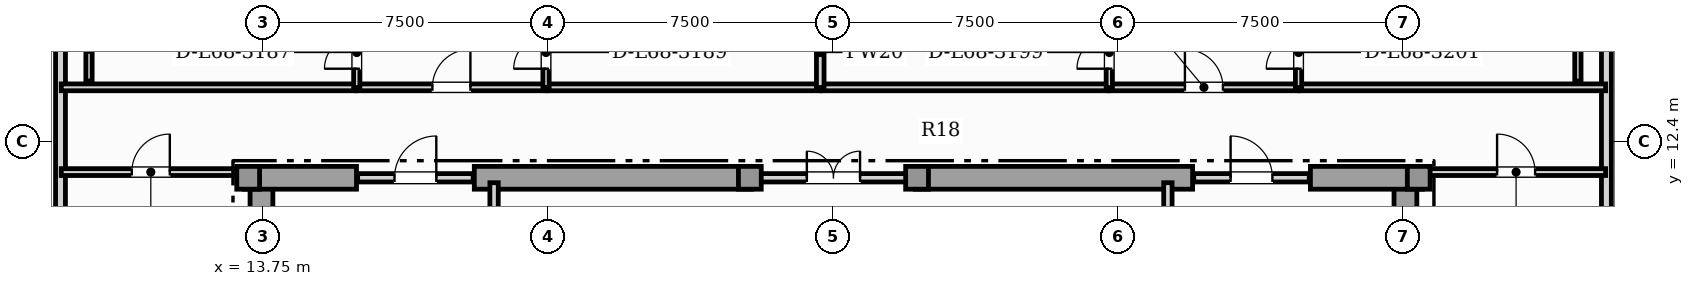
"""IFC4 building model, lengths in metres.
Left out: names, types, materials, properties, quantities, classifications, styles, units other than length and angle.
Written with IfcOpenShell. Run it as: python <this file> out.ifc"""

import sys

from ifc_helpers import new_model, si_unit, direction, frame, frame_2d, origin, origin_2d, place, context, subcontext, project, spatial, rectangle, extrude, element, fill, save


model = new_model("IFC4")
c1 = context("Model", 3, precision=1e-05, world=origin(), true_north=direction((0.0, 1.0)))
c2 = subcontext(c1, "Body", "Model", "MODEL_VIEW")
j1 = project(units=[si_unit("LENGTHUNIT", "METRE"), si_unit("PLANEANGLEUNIT", "RADIAN")], contexts=[c1])
p1 = place(None, origin())
s1 = spatial("IfcSite", under=j1, at=p1, CompositionType="ELEMENT")
p2 = place(p1, origin())
s2 = spatial("IfcBuilding", under=s1, at=p2, CompositionType="ELEMENT")
p3 = place(p2, frame((0.0, 0.0, 276.0)))
s3 = spatial("IfcBuildingStorey", under=s2, at=p3, CompositionType="ELEMENT", Elevation=276.0)
for number, where, z_axis, x_axis in (
    (1, (13.7, 0.92, 0.0), (0.0, 0.0, 1.0), (0.0, 1.0, 0.0)),
    (2, (43.8, 0.92, 0.0), (0.0, 0.0, 1.0), (0.0, 1.0, 0.0)),
):
    element("IfcWall", number, at=place(p3, frame(where, z_axis=z_axis, x_axis=x_axis)), inside=s3, PredefinedType="SHEAR", context=c2, shape_type="SweptSolid", body=[
        extrude(rectangle(XDim=10.53, YDim=0.6, at=frame_2d((5.265, 0.0))), origin(), (0.0, 0.0, 1.0), 4.85),
    ])
p4 = place(p3, frame((13.25, 11.45, 0.0), z_axis=(0.0, 0.0, 1.0), x_axis=(1.0, 0.0, 0.0)))
e3 = element("IfcWall", 3, at=p4, inside=s3, PredefinedType="SHEAR", context=c2, shape_type="SweptSolid", body=[
    extrude(rectangle(XDim=2.95, YDim=0.6, at=frame_2d((1.475, 0.0))), origin(), (0.0, 0.0, 1.0), 4.85),
])
for number, where, z_axis, x_axis in (
    (4, (19.3, 11.45, 0.0), (0.0, 0.0, 1.0), (1.0, 0.0, 0.0)),
    (5, (30.9, 11.45, 0.0), (0.0, 0.0, 1.0), (1.0, 0.0, 0.0)),
):
    element("IfcWall", number, at=place(p3, frame(where, z_axis=z_axis, x_axis=x_axis)), inside=s3, PredefinedType="SHEAR", context=c2, shape_type="SweptSolid", body=[
        extrude(rectangle(XDim=7.3, YDim=0.6, at=frame_2d((3.65, 0.0))), origin(), (0.0, 0.0, 1.0), 4.85),
    ])
p5 = place(p3, frame((41.3, 11.45, 0.0), z_axis=(0.0, 0.0, 1.0), x_axis=(1.0, 0.0, 0.0)))
e6 = element("IfcWall", 6, at=p5, inside=s3, PredefinedType="SHEAR", context=c2, shape_type="SweptSolid", body=[
    extrude(rectangle(XDim=2.95, YDim=0.6, at=frame_2d((1.475, 0.0))), origin(), (0.0, 0.0, 1.0), 4.85),
])
for number, where, z_axis, x_axis in (
    (7, (13.35, 11.45, 0.0), (0.0, 0.0, 1.0), (1.0, 0.0, 0.0)),
    (8, (44.15, 11.45, 0.0), (0.0, 0.0, 1.0), (1.0, 0.0, 0.0)),
    (9, (26.55, 11.45, 0.0), (0.0, 0.0, 1.0), (1.0, 0.0, 0.0)),
    (10, (30.95, 11.45, 0.0), (0.0, 0.0, 1.0), (1.0, 0.0, 0.0)),
):
    element("IfcColumn", number, at=place(p3, frame(where, z_axis=z_axis, x_axis=x_axis)), inside=s3, PredefinedType="COLUMN", context=c2, shape_type="SweptSolid", body=[
        extrude(rectangle(XDim=0.6, YDim=0.6, at=origin_2d()), origin(), (0.0, 0.0, 1.0), 5.05),
    ])
p6 = place(p3, frame((49.088, 3.24, 0.0), z_axis=(0.0, 0.0, 1.0), x_axis=(0.0, 1.0, 0.0)))
e11 = element("IfcWall", 11, at=p6, inside=s3, PredefinedType="SOLIDWALL", context=c2, shape_type="SweptSolid", body=[
    extrude(rectangle(XDim=15.289, YDim=0.26, at=frame_2d((7.645, 0.0))), origin(), (0.0, 0.0, 1.0), 4.85),
])
p7 = place(p6, frame((12.739, 0.0, 0.95)))
e12 = element("IfcOpeningElement", 12, at=p7, cuts=e11, PredefinedType="OPENING", context=c2, shape_type="SweptSolid", body=[
    extrude(rectangle(XDim=0.9, YDim=1.5, at=frame_2d((0.45, 0.75))), frame((0.0, 0.14, 0.0), z_axis=(0.0, -1.0, 0.0), x_axis=(1.0, 0.0, 0.0)), (0.0, 0.0, 1.0), 0.28),
])
p8 = place(p3, frame((8.412, 18.529, 0.0), z_axis=(0.0, 0.0, 1.0), x_axis=(0.0, -1.0, 0.0)))
e13 = element("IfcWall", 13, at=p8, inside=s3, PredefinedType="SOLIDWALL", context=c2, shape_type="SweptSolid", body=[
    extrude(rectangle(XDim=15.289, YDim=0.26, at=frame_2d((7.645, 0.0))), origin(), (0.0, 0.0, 1.0), 4.85),
])
p9 = place(p8, frame((9.239, 0.0, 0.85)))
e14 = element("IfcOpeningElement", 14, at=p9, cuts=e13, PredefinedType="OPENING", context=c2, shape_type="SweptSolid", body=[
    extrude(rectangle(XDim=2.4, YDim=2.0, at=frame_2d((1.2, 1.0))), frame((0.0, 0.14, 0.0), z_axis=(0.0, -1.0, 0.0), x_axis=(1.0, 0.0, 0.0)), (0.0, 0.0, 1.0), 0.28),
])
p10 = place(p3, frame((19.82, 8.52, 0.0), z_axis=(0.0, 0.0, 1.0), x_axis=(0.0, 1.0, 0.0)))
e15 = element("IfcWall", 15, at=p10, inside=s3, PredefinedType="SOLIDWALL", context=c2, shape_type="SweptSolid", body=[
    extrude(rectangle(XDim=2.8, YDim=0.22, at=frame_2d((1.4, 0.0))), origin(), (0.0, 0.0, 1.0), 4.305),
])
p11 = place(p10, frame((0.85, 0.0, 0.0)))
e16 = element("IfcOpeningElement", 16, at=p11, cuts=e15, PredefinedType="OPENING", context=c2, shape_type="SweptSolid", body=[
    extrude(rectangle(XDim=1.1, YDim=2.2, at=frame_2d((0.55, 1.1))), frame((0.0, 0.12, 0.0), z_axis=(0.0, -1.0, 0.0), x_axis=(1.0, 0.0, 0.0)), (0.0, 0.0, 1.0), 0.24),
])
p12 = place(p3, frame((37.55, 8.52, 0.0), z_axis=(0.0, 0.0, 1.0), x_axis=(0.0, 1.0, 0.0)))
e17 = element("IfcWall", 17, at=p12, inside=s3, PredefinedType="SOLIDWALL", context=c2, shape_type="SweptSolid", body=[
    extrude(rectangle(XDim=2.8, YDim=0.22, at=frame_2d((1.4, 0.0))), origin(), (0.0, 0.0, 1.0), 4.305),
])
p13 = place(p12, frame((0.85, 0.0, 0.0)))
e18 = element("IfcOpeningElement", 18, at=p13, cuts=e17, PredefinedType="OPENING", context=c2, shape_type="SweptSolid", body=[
    extrude(rectangle(XDim=1.1, YDim=2.2, at=frame_2d((0.55, 1.1))), frame((0.0, 0.12, 0.0), z_axis=(0.0, -1.0, 0.0), x_axis=(1.0, 0.0, 0.0)), (0.0, 0.0, 1.0), 0.24),
])
p14 = place(p3, frame((16.23, 11.45, 0.0), z_axis=(0.0, 0.0, 1.0), x_axis=(1.0, 0.0, 0.0)))
e19 = element("IfcWall", 19, at=p14, inside=s3, PredefinedType="SOLIDWALL", context=c2, shape_type="SweptSolid", body=[
    extrude(rectangle(XDim=3.04, YDim=0.22, at=frame_2d((1.52, 0.0))), origin(), (0.0, 0.0, 1.0), 4.85),
])
p15 = place(p14, frame((0.97, 0.0, 0.0)))
e20 = element("IfcOpeningElement", 20, at=p15, cuts=e19, PredefinedType="OPENING", context=c2, shape_type="SweptSolid", body=[
    extrude(rectangle(XDim=1.1, YDim=2.2, at=frame_2d((0.55, 1.1))), frame((0.0, 0.12, 0.0), z_axis=(0.0, -1.0, 0.0), x_axis=(1.0, 0.0, 0.0)), (0.0, 0.0, 1.0), 0.24),
])
p16 = place(p3, frame((26.63, 11.45, 0.0), z_axis=(0.0, 0.0, 1.0), x_axis=(1.0, 0.0, 0.0)))
e21 = element("IfcWall", 21, at=p16, inside=s3, PredefinedType="SOLIDWALL", context=c2, shape_type="SweptSolid", body=[
    extrude(rectangle(XDim=4.24, YDim=0.22, at=frame_2d((2.12, 0.0))), origin(), (0.0, 0.0, 1.0), 4.85),
])
p17 = place(p16, frame((1.42, 0.0, 0.0)))
e22 = element("IfcOpeningElement", 22, at=p17, cuts=e21, PredefinedType="OPENING", context=c2, shape_type="SweptSolid", body=[
    extrude(rectangle(XDim=1.4, YDim=2.2, at=frame_2d((0.7, 1.1))), frame((0.0, 0.12, 0.0), z_axis=(0.0, -1.0, 0.0), x_axis=(1.0, 0.0, 0.0)), (0.0, 0.0, 1.0), 0.24),
])
p18 = place(p3, frame((38.23, 11.45, 0.0), z_axis=(0.0, 0.0, 1.0), x_axis=(1.0, 0.0, 0.0)))
e23 = element("IfcWall", 23, at=p18, inside=s3, PredefinedType="SOLIDWALL", context=c2, shape_type="SweptSolid", body=[
    extrude(rectangle(XDim=3.04, YDim=0.22, at=frame_2d((1.52, 0.0))), origin(), (0.0, 0.0, 1.0), 4.85),
])
p19 = place(p18, frame((0.97, 0.0, 0.0)))
e24 = element("IfcOpeningElement", 24, at=p19, cuts=e23, PredefinedType="OPENING", context=c2, shape_type="SweptSolid", body=[
    extrude(rectangle(XDim=1.1, YDim=2.2, at=frame_2d((0.55, 1.1))), frame((0.0, 0.12, 0.0), z_axis=(0.0, -1.0, 0.0), x_axis=(1.0, 0.0, 0.0)), (0.0, 0.0, 1.0), 0.24),
])
p20 = place(p3, frame((8.431, 11.6, 0.0), z_axis=(0.0, 0.0, 1.0), x_axis=(1.0, 0.0, 0.0)))
e25 = element("IfcWall", 25, at=p20, inside=s3, PredefinedType="PARTITIONING", context=c2, shape_type="SweptSolid", body=[
    extrude(rectangle(XDim=4.714, YDim=0.18, at=frame_2d((2.357, 0.0))), origin(), (0.0, 0.0, 1.0), 4.85),
])
p21 = place(p20, frame((1.857, 0.0, 0.0)))
e26 = element("IfcOpeningElement", 26, at=p21, cuts=e25, PredefinedType="OPENING", context=c2, shape_type="SweptSolid", body=[
    extrude(rectangle(XDim=1.0, YDim=2.15, at=frame_2d((0.5, 1.075))), frame((0.0, 0.1, 0.0), z_axis=(0.0, -1.0, 0.0), x_axis=(1.0, 0.0, 0.0)), (0.0, 0.0, 1.0), 0.2),
])
p22 = place(p3, frame((44.355, 11.6, 0.0), z_axis=(0.0, 0.0, 1.0), x_axis=(1.0, 0.0, 0.0)))
e27 = element("IfcWall", 27, at=p22, inside=s3, PredefinedType="PARTITIONING", context=c2, shape_type="SweptSolid", body=[
    extrude(rectangle(XDim=4.714, YDim=0.18, at=frame_2d((2.357, 0.0))), origin(), (0.0, 0.0, 1.0), 4.85),
])
p23 = place(p22, frame((1.857, 0.0, 0.0)))
e28 = element("IfcOpeningElement", 28, at=p23, cuts=e27, PredefinedType="OPENING", context=c2, shape_type="SweptSolid", body=[
    extrude(rectangle(XDim=1.0, YDim=2.15, at=frame_2d((0.5, 1.075))), frame((0.0, 0.1, 0.0), z_axis=(0.0, -1.0, 0.0), x_axis=(1.0, 0.0, 0.0)), (0.0, 0.0, 1.0), 0.2),
])
p24 = place(p3, frame((16.202, 13.83, 0.0), z_axis=(0.0, 0.0, 1.0), x_axis=(1.0, 0.0, 0.0)))
e29 = element("IfcWall", 29, at=p24, inside=s3, PredefinedType="PARTITIONING", context=c2, shape_type="SweptSolid", body=[
    extrude(rectangle(XDim=4.99, YDim=0.18, at=frame_2d((2.495, 0.0))), origin(), (0.0, 0.0, 1.0), 4.85),
])
p25 = place(p24, frame((1.995, 0.0, 0.0)))
e30 = element("IfcOpeningElement", 30, at=p25, cuts=e29, PredefinedType="OPENING", context=c2, shape_type="SweptSolid", body=[
    extrude(rectangle(XDim=1.0, YDim=2.15, at=frame_2d((0.5, 1.075))), frame((0.0, 0.1, 0.0), z_axis=(0.0, -1.0, 0.0), x_axis=(1.0, 0.0, 0.0)), (0.0, 0.0, 1.0), 0.2),
])
p26 = place(p3, frame((8.431, 13.83, 0.0), z_axis=(0.0, 0.0, 1.0), x_axis=(1.0, 0.0, 0.0)))
e31 = element("IfcWall", 31, at=p26, inside=s3, PredefinedType="PARTITIONING", context=c2, shape_type="SweptSolid", body=[
    extrude(rectangle(XDim=7.741, YDim=0.18, at=frame_2d((3.871, 0.0))), origin(), (0.0, 0.0, 1.0), 4.85),
])
p27 = place(p3, frame((21.222, 13.83, 0.0), z_axis=(0.0, 0.0, 1.0), x_axis=(1.0, 0.0, 0.0)))
e32 = element("IfcWall", 32, at=p27, inside=s3, PredefinedType="PARTITIONING", context=c2, shape_type="SweptSolid", body=[
    extrude(rectangle(XDim=7.185, YDim=0.18, at=frame_2d((3.593, 0.0))), origin(), (0.0, 0.0, 1.0), 4.85),
])
p28 = place(p3, frame((36.003, 13.83, 0.0), z_axis=(0.0, 0.0, 1.0), x_axis=(1.0, 0.0, 0.0)))
e33 = element("IfcWall", 33, at=p28, inside=s3, PredefinedType="PARTITIONING", context=c2, shape_type="SweptSolid", body=[
    extrude(rectangle(XDim=4.99, YDim=0.18, at=frame_2d((2.495, 0.0))), origin(), (0.0, 0.0, 1.0), 4.85),
])
p29 = place(p28, frame((1.995, 0.0, 0.0)))
e34 = element("IfcOpeningElement", 34, at=p29, cuts=e33, PredefinedType="OPENING", context=c2, shape_type="SweptSolid", body=[
    extrude(rectangle(XDim=1.0, YDim=2.15, at=frame_2d((0.5, 1.075))), frame((0.0, 0.1, 0.0), z_axis=(0.0, -1.0, 0.0), x_axis=(1.0, 0.0, 0.0)), (0.0, 0.0, 1.0), 0.2),
])
p30 = place(p3, frame((28.438, 13.83, 0.0), z_axis=(0.0, 0.0, 1.0), x_axis=(1.0, 0.0, 0.0)))
e35 = element("IfcWall", 35, at=p30, inside=s3, PredefinedType="PARTITIONING", context=c2, shape_type="SweptSolid", body=[
    extrude(rectangle(XDim=7.535, YDim=0.18, at=frame_2d((3.768, 0.0))), origin(), (0.0, 0.0, 1.0), 4.85),
])
p31 = place(p3, frame((41.023, 13.83, 0.0), z_axis=(0.0, 0.0, 1.0), x_axis=(1.0, 0.0, 0.0)))
e36 = element("IfcWall", 36, at=p31, inside=s3, PredefinedType="PARTITIONING", context=c2, shape_type="SweptSolid", body=[
    extrude(rectangle(XDim=8.046, YDim=0.18, at=frame_2d((4.023, 0.0))), origin(), (0.0, 0.0, 1.0), 4.85),
])
p32 = place(p3, frame((16.208, 13.825, 0.0), z_axis=(0.0, 0.0, 1.0), x_axis=(0.0, 1.0, 0.0)))
e37 = element("IfcWall", 37, at=p32, inside=s3, PredefinedType="PLUMBINGWALL", context=c2, shape_type="SweptSolid", body=[
    extrude(rectangle(XDim=1.84, YDim=0.165, at=frame_2d((0.92, 0.0))), origin(), (0.0, 0.0, 1.0), 4.85),
])
p33 = place(p32, frame((0.495, 0.0, 0.0)))
e38 = element("IfcOpeningElement", 38, at=p33, cuts=e37, PredefinedType="OPENING", context=c2, shape_type="SweptSolid", body=[
    extrude(rectangle(XDim=0.85, YDim=2.1, at=frame_2d((0.425, 1.05))), frame((0.0, 0.093, 0.0), z_axis=(0.0, -1.0, 0.0), x_axis=(1.0, 0.0, 0.0)), (0.0, 0.0, 1.0), 0.185),
])
p34 = place(p3, frame((21.188, 13.825, 0.0), z_axis=(0.0, 0.0, 1.0), x_axis=(0.0, 1.0, 0.0)))
e39 = element("IfcWall", 39, at=p34, inside=s3, PredefinedType="PLUMBINGWALL", context=c2, shape_type="SweptSolid", body=[
    extrude(rectangle(XDim=1.84, YDim=0.165, at=frame_2d((0.92, 0.0))), origin(), (0.0, 0.0, 1.0), 4.495),
])
p35 = place(p34, frame((0.495, 0.0, 0.0)))
e40 = element("IfcOpeningElement", 40, at=p35, cuts=e39, PredefinedType="OPENING", context=c2, shape_type="SweptSolid", body=[
    extrude(rectangle(XDim=0.85, YDim=2.1, at=frame_2d((0.425, 1.05))), frame((0.0, 0.093, 0.0), z_axis=(0.0, -1.0, 0.0), x_axis=(1.0, 0.0, 0.0)), (0.0, 0.0, 1.0), 0.185),
])
p36 = place(p3, frame((28.403, 13.825, 0.0), z_axis=(0.0, 0.0, 1.0), x_axis=(0.0, 1.0, 0.0)))
e41 = element("IfcWall", 41, at=p36, inside=s3, PredefinedType="PARTITIONING", context=c2, shape_type="SweptSolid", body=[
    extrude(rectangle(XDim=1.84, YDim=0.2, at=frame_2d((0.92, 0.0))), origin(), (0.0, 0.0, 1.0), 4.85),
])
p37 = place(p3, frame((36.008, 13.825, 0.0), z_axis=(0.0, 0.0, 1.0), x_axis=(0.0, 1.0, 0.0)))
e42 = element("IfcWall", 42, at=p37, inside=s3, PredefinedType="PLUMBINGWALL", context=c2, shape_type="SweptSolid", body=[
    extrude(rectangle(XDim=1.84, YDim=0.165, at=frame_2d((0.92, 0.0))), origin(), (0.0, 0.0, 1.0), 4.85),
])
p38 = place(p37, frame((0.495, 0.0, 0.0)))
e43 = element("IfcOpeningElement", 43, at=p38, cuts=e42, PredefinedType="OPENING", context=c2, shape_type="SweptSolid", body=[
    extrude(rectangle(XDim=0.85, YDim=2.1, at=frame_2d((0.425, 1.05))), frame((0.0, 0.093, 0.0), z_axis=(0.0, -1.0, 0.0), x_axis=(1.0, 0.0, 0.0)), (0.0, 0.0, 1.0), 0.185),
])
p39 = place(p3, frame((40.988, 13.825, 0.0), z_axis=(0.0, 0.0, 1.0), x_axis=(0.0, 1.0, 0.0)))
e44 = element("IfcWall", 44, at=p39, inside=s3, PredefinedType="PLUMBINGWALL", context=c2, shape_type="SweptSolid", body=[
    extrude(rectangle(XDim=1.84, YDim=0.165, at=frame_2d((0.92, 0.0))), origin(), (0.0, 0.0, 1.0), 4.85),
])
p40 = place(p39, frame((0.495, 0.0, 0.0)))
e45 = element("IfcOpeningElement", 45, at=p40, cuts=e44, PredefinedType="OPENING", context=c2, shape_type="SweptSolid", body=[
    extrude(rectangle(XDim=0.85, YDim=2.1, at=frame_2d((0.425, 1.05))), frame((0.0, 0.093, 0.0), z_axis=(0.0, -1.0, 0.0), x_axis=(1.0, 0.0, 0.0)), (0.0, 0.0, 1.0), 0.185),
])
p41 = place(p3, frame((9.162, 13.995, 0.0), z_axis=(0.0, 0.0, 1.0), x_axis=(0.0, 1.0, 0.0)))
e46 = element("IfcWall", 46, at=p41, inside=s3, PredefinedType="PLUMBINGWALL", context=c2, shape_type="SweptSolid", body=[
    extrude(rectangle(XDim=1.67, YDim=0.165, at=frame_2d((0.835, 0.0))), origin(), (0.0, 0.0, 1.0), 4.85),
])
p42 = place(p3, frame((48.338, 15.495, 0.0), z_axis=(0.0, 0.0, 1.0), x_axis=(0.0, -1.0, 0.0)))
e47 = element("IfcWall", 47, at=p42, inside=s3, PredefinedType="PLUMBINGWALL", context=c2, shape_type="SweptSolid", body=[
    extrude(rectangle(XDim=1.5, YDim=0.165, at=frame_2d((0.75, 0.0))), origin(), (0.0, 0.0, 1.0), 4.85),
])
p43 = place(p15, origin())
e48 = element("IfcDoor", 48, at=p43, inside=s3, OperationType="SINGLE_SWING_RIGHT", PredefinedType="DOOR", context=c2, shape_type="SweptSolid", body=[
    extrude(rectangle(XDim=1.1, YDim=2.2, at=frame_2d((0.55, 1.1))), frame((0.0, 0.025, 0.0), z_axis=(0.0, -1.0, 0.0), x_axis=(1.0, 0.0, 0.0)), (0.0, 0.0, 1.0), 0.05),
])
fill(e20, e48)
p44 = place(p17, origin())
e49 = element("IfcDoor", 49, at=p44, inside=s3, OperationType="DOUBLE_DOOR_SINGLE_SWING", PredefinedType="DOOR", context=c2, shape_type="SweptSolid", body=[
    extrude(rectangle(XDim=1.4, YDim=2.2, at=frame_2d((0.7, 1.1))), frame((0.0, 0.025, 0.0), z_axis=(0.0, -1.0, 0.0), x_axis=(1.0, 0.0, 0.0)), (0.0, 0.0, 1.0), 0.05),
])
fill(e22, e49)
p45 = place(p19, origin())
e50 = element("IfcDoor", 50, at=p45, inside=s3, OperationType="SINGLE_SWING_LEFT", PredefinedType="DOOR", context=c2, shape_type="SweptSolid", body=[
    extrude(rectangle(XDim=1.1, YDim=2.2, at=frame_2d((0.55, 1.1))), frame((0.0, 0.025, 0.0), z_axis=(0.0, -1.0, 0.0), x_axis=(1.0, 0.0, 0.0)), (0.0, 0.0, 1.0), 0.05),
])
fill(e24, e50)
p46 = place(p21, origin())
e51 = element("IfcDoor", 51, at=p46, inside=s3, OperationType="SINGLE_SWING_RIGHT", PredefinedType="DOOR", context=c2, shape_type="SweptSolid", body=[
    extrude(rectangle(XDim=1.0, YDim=2.15, at=frame_2d((0.5, 1.075))), frame((0.0, 0.025, 0.0), z_axis=(0.0, -1.0, 0.0), x_axis=(1.0, 0.0, 0.0)), (0.0, 0.0, 1.0), 0.05),
])
fill(e26, e51)
p47 = place(p23, origin())
e52 = element("IfcDoor", 52, at=p47, inside=s3, OperationType="SINGLE_SWING_LEFT", PredefinedType="DOOR", context=c2, shape_type="SweptSolid", body=[
    extrude(rectangle(XDim=1.0, YDim=2.15, at=frame_2d((0.5, 1.075))), frame((0.0, 0.025, 0.0), z_axis=(0.0, -1.0, 0.0), x_axis=(1.0, 0.0, 0.0)), (0.0, 0.0, 1.0), 0.05),
])
fill(e28, e52)
p48 = place(p25, origin())
e53 = element("IfcDoor", 53, at=p48, inside=s3, OperationType="SINGLE_SWING_RIGHT", PredefinedType="DOOR", context=c2, shape_type="SweptSolid", body=[
    extrude(rectangle(XDim=1.0, YDim=2.15, at=frame_2d((0.5, 1.075))), frame((0.0, 0.025, 0.0), z_axis=(0.0, -1.0, 0.0), x_axis=(1.0, 0.0, 0.0)), (0.0, 0.0, 1.0), 0.05),
])
fill(e30, e53)
p49 = place(p29, origin())
e54 = element("IfcDoor", 54, at=p49, inside=s3, OperationType="SINGLE_SWING_LEFT", PredefinedType="DOOR", context=c2, shape_type="SweptSolid", body=[
    extrude(rectangle(XDim=1.0, YDim=2.15, at=frame_2d((0.5, 1.075))), frame((0.0, 0.025, 0.0), z_axis=(0.0, -1.0, 0.0), x_axis=(1.0, 0.0, 0.0)), (0.0, 0.0, 1.0), 0.05),
])
fill(e34, e54)
p50 = place(p33, origin())
e55 = element("IfcDoor", 55, at=p50, inside=s3, OperationType="SINGLE_SWING_LEFT", PredefinedType="DOOR", context=c2, shape_type="SweptSolid", body=[
    extrude(rectangle(XDim=0.85, YDim=2.1, at=frame_2d((0.425, 1.05))), frame((0.0, 0.025, 0.0), z_axis=(0.0, -1.0, 0.0), x_axis=(1.0, 0.0, 0.0)), (0.0, 0.0, 1.0), 0.05),
])
fill(e38, e55)
p51 = place(p35, origin())
e56 = element("IfcDoor", 56, at=p51, inside=s3, OperationType="SINGLE_SWING_LEFT", PredefinedType="DOOR", context=c2, shape_type="SweptSolid", body=[
    extrude(rectangle(XDim=0.85, YDim=2.1, at=frame_2d((0.425, 1.05))), frame((0.0, 0.025, 0.0), z_axis=(0.0, -1.0, 0.0), x_axis=(1.0, 0.0, 0.0)), (0.0, 0.0, 1.0), 0.05),
])
fill(e40, e56)
p52 = place(p38, origin())
e57 = element("IfcDoor", 57, at=p52, inside=s3, OperationType="SINGLE_SWING_LEFT", PredefinedType="DOOR", context=c2, shape_type="SweptSolid", body=[
    extrude(rectangle(XDim=0.85, YDim=2.1, at=frame_2d((0.425, 1.05))), frame((0.0, 0.025, 0.0), z_axis=(0.0, -1.0, 0.0), x_axis=(1.0, 0.0, 0.0)), (0.0, 0.0, 1.0), 0.05),
])
fill(e43, e57)
p53 = place(p40, origin())
e58 = element("IfcDoor", 58, at=p53, inside=s3, OperationType="SINGLE_SWING_LEFT", PredefinedType="DOOR", context=c2, shape_type="SweptSolid", body=[
    extrude(rectangle(XDim=0.85, YDim=2.1, at=frame_2d((0.425, 1.05))), frame((0.0, 0.025, 0.0), z_axis=(0.0, -1.0, 0.0), x_axis=(1.0, 0.0, 0.0)), (0.0, 0.0, 1.0), 0.05),
])
fill(e45, e58)
save(model, sys.argv[1])
